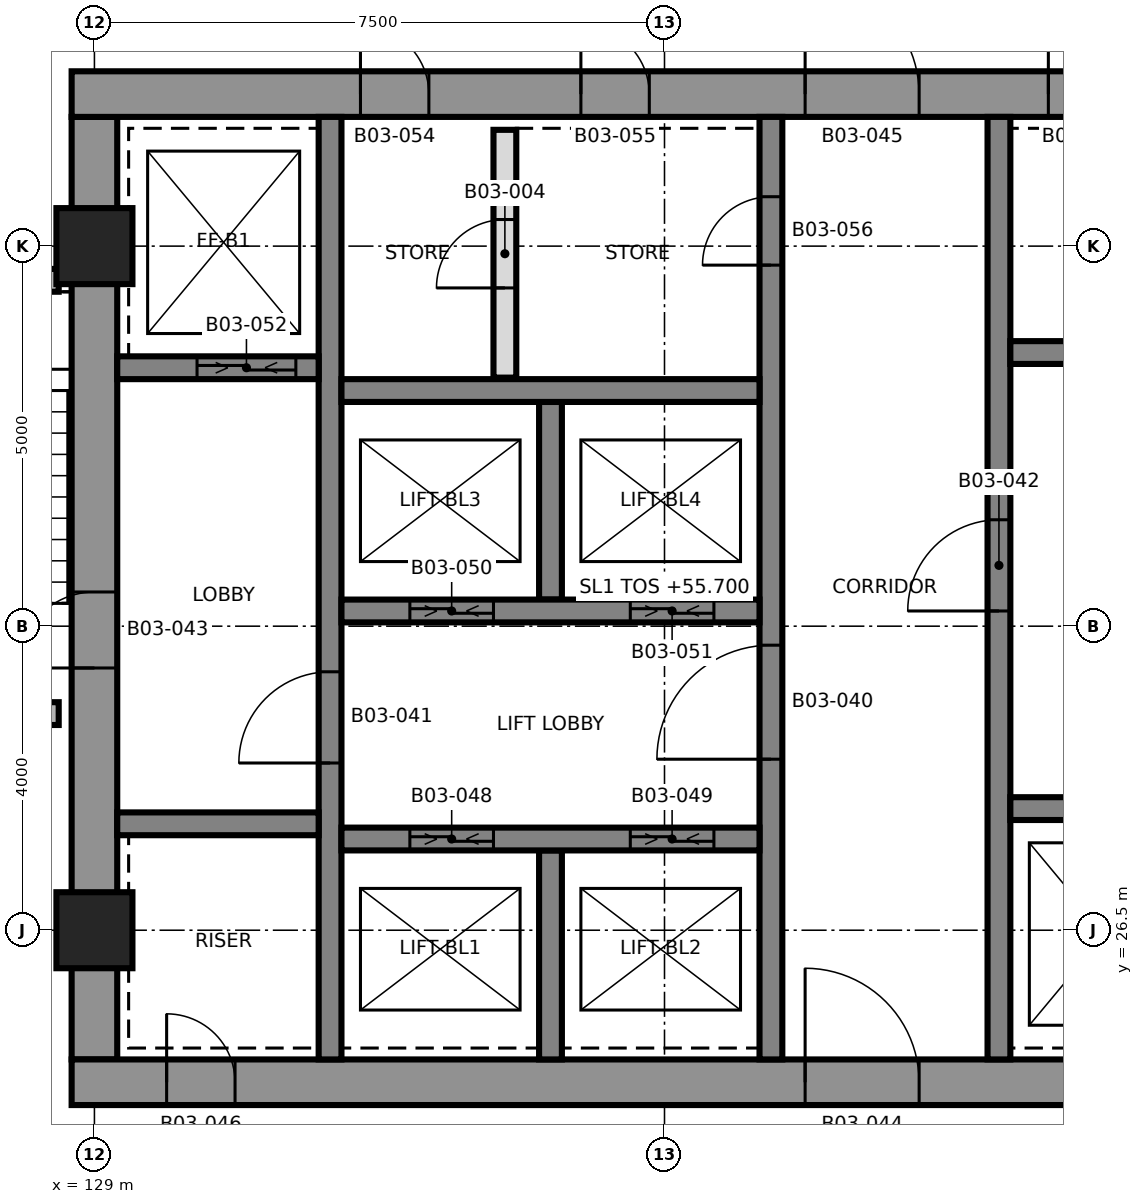
"""IFC4 building model, lengths in metres.
Left out: names, types, materials, properties, quantities, classifications, styles, units other than length and angle.
Written with IfcOpenShell. Run it as: python <this file> out.ifc"""

import sys

from ifc_helpers import new_model, si_unit, direction, frame, frame_2d, origin, origin_2d, place, context, subcontext, project, spatial, rectangle, extrude, element, fill, save


model = new_model("IFC4")
c1 = context("Model", 3, precision=1e-05, world=origin(), true_north=direction((0.0, 1.0)))
c2 = subcontext(c1, "Body", "Model", "MODEL_VIEW")
j1 = project(units=[si_unit("LENGTHUNIT", "METRE"), si_unit("PLANEANGLEUNIT", "RADIAN")], contexts=[c1])
p1 = place(None, origin())
s1 = spatial("IfcSite", under=j1, at=p1, CompositionType="ELEMENT")
p2 = place(p1, origin())
s2 = spatial("IfcBuilding", under=s1, at=p2, CompositionType="ELEMENT")
p3 = place(p2, frame((0.0, 0.0, 55.7)))
s3 = spatial("IfcBuildingStorey", under=s2, at=p3, CompositionType="ELEMENT", Elevation=55.7)
p4 = place(p3, frame((129.0, 24.8, 0.0), z_axis=(0.0, 0.0, 1.0), x_axis=(0.0, 1.0, 0.0)))
e1 = element("IfcWall", 1, at=p4, inside=s3, PredefinedType="SHEAR", context=c2, shape_type="SweptSolid", body=[
    extrude(rectangle(XDim=12.4, YDim=0.6, at=frame_2d((6.2, 0.0))), origin(), (0.0, 0.0, 1.0), 3.7),
])
p5 = place(p4, frame((5.15, 0.0, 0.0)))
e2 = element("IfcOpeningElement", 2, at=p5, cuts=e1, PredefinedType="OPENING", context=c2, shape_type="SweptSolid", body=[
    extrude(rectangle(XDim=1.0, YDim=2.1, at=frame_2d((0.5, 1.05))), frame((0.0, 0.31, 0.0), z_axis=(0.0, -1.0, 0.0), x_axis=(1.0, 0.0, 0.0)), (0.0, 0.0, 1.0), 0.62),
])
p6 = place(p3, frame((128.7, 24.5, 0.0), z_axis=(0.0, 0.0, 1.0), x_axis=(1.0, 0.0, 0.0)))
e3 = element("IfcWall", 3, at=p6, inside=s3, PredefinedType="SHEAR", context=c2, shape_type="SweptSolid", body=[
    extrude(rectangle(XDim=15.0, YDim=0.6, at=frame_2d((7.5, 0.0))), origin(), (0.0, 0.0, 1.0), 3.7),
])
p7 = place(p6, frame((9.65, 0.0, 0.0)))
e4 = element("IfcOpeningElement", 4, at=p7, cuts=e3, PredefinedType="OPENING", context=c2, shape_type="SweptSolid", body=[
    extrude(rectangle(XDim=1.5, YDim=2.1, at=frame_2d((0.75, 1.05))), frame((0.0, 0.31, 0.0), z_axis=(0.0, -1.0, 0.0), x_axis=(1.0, 0.0, 0.0)), (0.0, 0.0, 1.0), 0.62),
])
p8 = place(p6, frame((1.25, 0.0, 0.0)))
e5 = element("IfcOpeningElement", 5, at=p8, cuts=e3, PredefinedType="OPENING", context=c2, shape_type="SweptSolid", body=[
    extrude(rectangle(XDim=0.9, YDim=2.1, at=frame_2d((0.45, 1.05))), frame((0.0, 0.31, 0.0), z_axis=(0.0, -1.0, 0.0), x_axis=(1.0, 0.0, 0.0)), (0.0, 0.0, 1.0), 0.62),
])
p9 = place(p3, frame((128.7, 37.5, 0.0), z_axis=(0.0, 0.0, 1.0), x_axis=(1.0, 0.0, 0.0)))
e6 = element("IfcWall", 6, at=p9, inside=s3, PredefinedType="SHEAR", context=c2, shape_type="SweptSolid", body=[
    extrude(rectangle(XDim=15.0, YDim=0.6, at=frame_2d((7.5, 0.0))), origin(), (0.0, 0.0, 1.0), 3.7),
])
p10 = place(p9, frame((9.65, 0.0, 0.0)))
e7 = element("IfcOpeningElement", 7, at=p10, cuts=e6, PredefinedType="OPENING", context=c2, shape_type="SweptSolid", body=[
    extrude(rectangle(XDim=1.5, YDim=2.1, at=frame_2d((0.75, 1.05))), frame((0.0, 0.31, 0.0), z_axis=(0.0, -1.0, 0.0), x_axis=(1.0, 0.0, 0.0)), (0.0, 0.0, 1.0), 0.62),
])
p11 = place(p9, frame((12.85, 0.0, 0.0)))
e8 = element("IfcOpeningElement", 8, at=p11, cuts=e6, PredefinedType="OPENING", context=c2, shape_type="SweptSolid", body=[
    extrude(rectangle(XDim=0.9, YDim=2.1, at=frame_2d((0.45, 1.05))), frame((0.0, 0.31, 0.0), z_axis=(0.0, -1.0, 0.0), x_axis=(1.0, 0.0, 0.0)), (0.0, 0.0, 1.0), 0.62),
])
p12 = place(p9, frame((3.8, 0.0, 0.0)))
e9 = element("IfcOpeningElement", 9, at=p12, cuts=e6, PredefinedType="OPENING", context=c2, shape_type="SweptSolid", body=[
    extrude(rectangle(XDim=0.9, YDim=2.1, at=frame_2d((0.45, 1.05))), frame((0.0, 0.31, 0.0), z_axis=(0.0, -1.0, 0.0), x_axis=(1.0, 0.0, 0.0)), (0.0, 0.0, 1.0), 0.62),
])
p13 = place(p9, frame((6.7, 0.0, 0.0)))
e10 = element("IfcOpeningElement", 10, at=p13, cuts=e6, PredefinedType="OPENING", context=c2, shape_type="SweptSolid", body=[
    extrude(rectangle(XDim=0.9, YDim=2.1, at=frame_2d((0.45, 1.05))), frame((0.0, 0.31, 0.0), z_axis=(0.0, -1.0, 0.0), x_axis=(1.0, 0.0, 0.0)), (0.0, 0.0, 1.0), 0.62),
])
p14 = place(p3, frame((132.1, 24.8, 0.0), z_axis=(0.0, 0.0, 1.0), x_axis=(0.0, 1.0, 0.0)))
e11 = element("IfcWall", 11, at=p14, inside=s3, PredefinedType="SHEAR", context=c2, shape_type="SweptSolid", body=[
    extrude(rectangle(XDim=12.4, YDim=0.3, at=frame_2d((6.2, 0.0))), origin(), (0.0, 0.0, 1.0), 3.7),
])
p15 = place(p14, frame((3.9, 0.0, 0.0)))
e12 = element("IfcOpeningElement", 12, at=p15, cuts=e11, PredefinedType="OPENING", context=c2, shape_type="SweptSolid", body=[
    extrude(rectangle(XDim=1.2, YDim=2.1, at=frame_2d((0.6, 1.05))), frame((0.0, 0.16, 0.0), z_axis=(0.0, -1.0, 0.0), x_axis=(1.0, 0.0, 0.0)), (0.0, 0.0, 1.0), 0.32),
])
p16 = place(p3, frame((137.9, 24.8, 0.0), z_axis=(0.0, 0.0, 1.0), x_axis=(0.0, 1.0, 0.0)))
e13 = element("IfcWall", 13, at=p16, inside=s3, PredefinedType="SHEAR", context=c2, shape_type="SweptSolid", body=[
    extrude(rectangle(XDim=12.4, YDim=0.3, at=frame_2d((6.2, 0.0))), origin(), (0.0, 0.0, 1.0), 3.7),
])
p17 = place(p16, frame((3.95, 0.0, 0.0)))
e14 = element("IfcOpeningElement", 14, at=p17, cuts=e13, PredefinedType="OPENING", context=c2, shape_type="SweptSolid", body=[
    extrude(rectangle(XDim=1.5, YDim=2.1, at=frame_2d((0.75, 1.05))), frame((0.0, 0.16, 0.0), z_axis=(0.0, -1.0, 0.0), x_axis=(1.0, 0.0, 0.0)), (0.0, 0.0, 1.0), 0.32),
])
p18 = place(p16, frame((10.45, 0.0, 0.0)))
e15 = element("IfcOpeningElement", 15, at=p18, cuts=e13, PredefinedType="OPENING", context=c2, shape_type="SweptSolid", body=[
    extrude(rectangle(XDim=0.9, YDim=2.1, at=frame_2d((0.45, 1.05))), frame((0.0, 0.16, 0.0), z_axis=(0.0, -1.0, 0.0), x_axis=(1.0, 0.0, 0.0)), (0.0, 0.0, 1.0), 0.32),
])
p19 = place(p3, frame((140.9, 24.8, 0.0), z_axis=(0.0, 0.0, 1.0), x_axis=(0.0, 1.0, 0.0)))
e16 = element("IfcWall", 16, at=p19, inside=s3, PredefinedType="SHEAR", context=c2, shape_type="SweptSolid", body=[
    extrude(rectangle(XDim=12.4, YDim=0.3, at=frame_2d((6.2, 0.0))), origin(), (0.0, 0.0, 1.0), 3.7),
])
p20 = place(p19, frame((5.9, 0.0, 0.0)))
e17 = element("IfcOpeningElement", 17, at=p20, cuts=e16, PredefinedType="OPENING", context=c2, shape_type="SweptSolid", body=[
    extrude(rectangle(XDim=1.2, YDim=2.1, at=frame_2d((0.6, 1.05))), frame((0.0, 0.16, 0.0), z_axis=(0.0, -1.0, 0.0), x_axis=(1.0, 0.0, 0.0)), (0.0, 0.0, 1.0), 0.32),
])
p21 = place(p3, frame((135.0, 24.8, 0.0), z_axis=(0.0, 0.0, 1.0), x_axis=(0.0, 1.0, 0.0)))
e18 = element("IfcWall", 18, at=p21, inside=s3, PredefinedType="SHEAR", context=c2, shape_type="SweptSolid", body=[
    extrude(rectangle(XDim=2.75, YDim=0.3, at=frame_2d((1.375, 0.0))), origin(), (0.0, 0.0, 1.0), 3.7),
])
p22 = place(p3, frame((135.0, 30.85, 0.0), z_axis=(0.0, 0.0, 1.0), x_axis=(0.0, 1.0, 0.0)))
e19 = element("IfcWall", 19, at=p22, inside=s3, PredefinedType="SHEAR", context=c2, shape_type="SweptSolid", body=[
    extrude(rectangle(XDim=2.6, YDim=0.3, at=frame_2d((1.3, 0.0))), origin(), (0.0, 0.0, 1.0), 3.7),
])
p23 = place(p3, frame((132.25, 27.7, 0.0), z_axis=(0.0, 0.0, 1.0), x_axis=(1.0, 0.0, 0.0)))
e20 = element("IfcWall", 20, at=p23, inside=s3, PredefinedType="SHEAR", context=c2, shape_type="SweptSolid", body=[
    extrude(rectangle(XDim=5.5, YDim=0.3, at=frame_2d((2.75, 0.0))), origin(), (0.0, 0.0, 1.0), 3.7),
])
p24 = place(p23, frame((0.9, 0.0, 0.0)))
e21 = element("IfcOpeningElement", 21, at=p24, cuts=e20, PredefinedType="OPENING", context=c2, shape_type="SweptSolid", body=[
    extrude(rectangle(XDim=1.1, YDim=2.4, at=frame_2d((0.55, 1.2))), frame((0.0, 0.16, 0.0), z_axis=(0.0, -1.0, 0.0), x_axis=(1.0, 0.0, 0.0)), (0.0, 0.0, 1.0), 0.32),
])
p25 = place(p23, frame((3.8, 0.0, 0.0)))
e22 = element("IfcOpeningElement", 22, at=p25, cuts=e20, PredefinedType="OPENING", context=c2, shape_type="SweptSolid", body=[
    extrude(rectangle(XDim=1.1, YDim=2.4, at=frame_2d((0.55, 1.2))), frame((0.0, 0.16, 0.0), z_axis=(0.0, -1.0, 0.0), x_axis=(1.0, 0.0, 0.0)), (0.0, 0.0, 1.0), 0.32),
])
p26 = place(p3, frame((132.25, 30.7, 0.0), z_axis=(0.0, 0.0, 1.0), x_axis=(1.0, 0.0, 0.0)))
e23 = element("IfcWall", 23, at=p26, inside=s3, PredefinedType="SHEAR", context=c2, shape_type="SweptSolid", body=[
    extrude(rectangle(XDim=5.5, YDim=0.3, at=frame_2d((2.75, 0.0))), origin(), (0.0, 0.0, 1.0), 3.7),
])
p27 = place(p26, frame((0.9, 0.0, 0.0)))
e24 = element("IfcOpeningElement", 24, at=p27, cuts=e23, PredefinedType="OPENING", context=c2, shape_type="SweptSolid", body=[
    extrude(rectangle(XDim=1.1, YDim=2.4, at=frame_2d((0.55, 1.2))), frame((0.0, 0.16, 0.0), z_axis=(0.0, -1.0, 0.0), x_axis=(1.0, 0.0, 0.0)), (0.0, 0.0, 1.0), 0.32),
])
p28 = place(p26, frame((3.8, 0.0, 0.0)))
e25 = element("IfcOpeningElement", 25, at=p28, cuts=e23, PredefinedType="OPENING", context=c2, shape_type="SweptSolid", body=[
    extrude(rectangle(XDim=1.1, YDim=2.4, at=frame_2d((0.55, 1.2))), frame((0.0, 0.16, 0.0), z_axis=(0.0, -1.0, 0.0), x_axis=(1.0, 0.0, 0.0)), (0.0, 0.0, 1.0), 0.32),
])
p29 = place(p3, frame((132.25, 33.6, 0.0), z_axis=(0.0, 0.0, 1.0), x_axis=(1.0, 0.0, 0.0)))
e26 = element("IfcWall", 26, at=p29, inside=s3, PredefinedType="SHEAR", context=c2, shape_type="SweptSolid", body=[
    extrude(rectangle(XDim=5.5, YDim=0.3, at=frame_2d((2.75, 0.0))), origin(), (0.0, 0.0, 1.0), 3.7),
])
p30 = place(p3, frame((129.3, 27.9, 0.0), z_axis=(0.0, 0.0, 1.0), x_axis=(1.0, 0.0, 0.0)))
e27 = element("IfcWall", 27, at=p30, inside=s3, PredefinedType="SHEAR", context=c2, shape_type="SweptSolid", body=[
    extrude(rectangle(XDim=2.65, YDim=0.3, at=frame_2d((1.325, 0.0))), origin(), (0.0, 0.0, 1.0), 3.7),
])
p31 = place(p3, frame((129.3, 33.9, 0.0), z_axis=(0.0, 0.0, 1.0), x_axis=(1.0, 0.0, 0.0)))
e28 = element("IfcWall", 28, at=p31, inside=s3, PredefinedType="SHEAR", context=c2, shape_type="SweptSolid", body=[
    extrude(rectangle(XDim=2.65, YDim=0.3, at=frame_2d((1.325, 0.0))), origin(), (0.0, 0.0, 1.0), 3.7),
])
p32 = place(p31, frame((1.05, 0.0, 0.0)))
e29 = element("IfcOpeningElement", 29, at=p32, cuts=e28, PredefinedType="OPENING", context=c2, shape_type="SweptSolid", body=[
    extrude(rectangle(XDim=1.3, YDim=2.4, at=frame_2d((0.65, 1.2))), frame((0.0, 0.16, 0.0), z_axis=(0.0, -1.0, 0.0), x_axis=(1.0, 0.0, 0.0)), (0.0, 0.0, 1.0), 0.32),
])
p33 = place(p3, frame((141.05, 28.1, 0.0), z_axis=(0.0, 0.0, 1.0), x_axis=(1.0, 0.0, 0.0)))
e30 = element("IfcWall", 30, at=p33, inside=s3, PredefinedType="SHEAR", context=c2, shape_type="SweptSolid", body=[
    extrude(rectangle(XDim=2.65, YDim=0.3, at=frame_2d((1.325, 0.0))), origin(), (0.0, 0.0, 1.0), 3.7),
])
p34 = place(p33, frame((0.75, 0.0, 0.0)))
e31 = element("IfcOpeningElement", 31, at=p34, cuts=e30, PredefinedType="OPENING", context=c2, shape_type="SweptSolid", body=[
    extrude(rectangle(XDim=1.3, YDim=2.4, at=frame_2d((0.65, 1.2))), frame((0.0, 0.16, 0.0), z_axis=(0.0, -1.0, 0.0), x_axis=(1.0, 0.0, 0.0)), (0.0, 0.0, 1.0), 0.32),
])
p35 = place(p3, frame((141.05, 34.1, 0.0), z_axis=(0.0, 0.0, 1.0), x_axis=(1.0, 0.0, 0.0)))
e32 = element("IfcWall", 32, at=p35, inside=s3, PredefinedType="SHEAR", context=c2, shape_type="SweptSolid", body=[
    extrude(rectangle(XDim=2.65, YDim=0.3, at=frame_2d((1.325, 0.0))), origin(), (0.0, 0.0, 1.0), 3.7),
])
for number, where, z_axis, x_axis in (
    (33, (129.0, 26.5, 0.0), (0.0, 0.0, 1.0), (1.0, 0.0, 0.0)),
    (34, (129.0, 35.5, 0.0), (0.0, 0.0, 1.0), (1.0, 0.0, 0.0)),
):
    element("IfcColumn", number, at=place(p3, frame(where, z_axis=z_axis, x_axis=x_axis)), inside=s3, PredefinedType="COLUMN", context=c2, shape_type="SweptSolid", body=[
        extrude(rectangle(XDim=1.0, YDim=1.0, at=origin_2d()), origin(), (0.0, 0.0, 1.0), 3.7),
    ])
p36 = place(p3, frame((125.7, 29.35, 0.0), z_axis=(0.0, 0.0, 1.0), x_axis=(1.0, 0.0, 0.0)))
e35 = element("IfcWall", 35, at=p36, inside=s3, PredefinedType="SHEAR", context=c2, shape_type="SweptSolid", body=[
    extrude(rectangle(XDim=2.83, YDim=0.3, at=frame_2d((1.415, 0.0))), origin(), (0.0, 0.0, 1.0), 3.4),
])
p37 = place(p36, frame((0.975, 0.0, 0.0)))
e36 = element("IfcOpeningElement", 36, at=p37, cuts=e35, PredefinedType="OPENING", context=c2, shape_type="SweptSolid", body=[
    extrude(rectangle(XDim=1.2, YDim=2.1, at=frame_2d((0.6, 1.05))), frame((0.0, 0.16, 0.0), z_axis=(0.0, -1.0, 0.0), x_axis=(1.0, 0.0, 0.0)), (0.0, 0.0, 1.0), 0.32),
])
p38 = place(p3, frame((125.7, 35.05, 0.0), z_axis=(0.0, 0.0, 1.0), x_axis=(1.0, 0.0, 0.0)))
e37 = element("IfcWall", 37, at=p38, inside=s3, PredefinedType="SHEAR", context=c2, shape_type="SweptSolid", body=[
    extrude(rectangle(XDim=2.83, YDim=0.3, at=frame_2d((1.415, 0.0))), origin(), (0.0, 0.0, 1.0), 3.4),
])
p39 = place(p3, frame((134.4, 33.77, 0.0), z_axis=(0.0, 0.0, 1.0), x_axis=(0.0, 1.0, 0.0)))
e38 = element("IfcWall", 38, at=p39, inside=s3, PredefinedType="PARTITIONING", context=c2, shape_type="SweptSolid", body=[
    extrude(rectangle(XDim=3.26, YDim=0.3, at=frame_2d((1.63, 0.0))), origin(), (0.0, 0.0, 1.0), 3.4),
])
p40 = place(p39, frame((1.18, 0.0, 0.0)))
e39 = element("IfcOpeningElement", 39, at=p40, cuts=e38, PredefinedType="OPENING", context=c2, shape_type="SweptSolid", body=[
    extrude(rectangle(XDim=0.9, YDim=2.1, at=frame_2d((0.45, 1.05))), frame((0.0, 0.16, 0.0), z_axis=(0.0, -1.0, 0.0), x_axis=(1.0, 0.0, 0.0)), (0.0, 0.0, 1.0), 0.32),
])
p41 = place(p40, origin())
e40 = element("IfcDoor", 40, at=p41, inside=s3, OperationType="SINGLE_SWING_RIGHT", PredefinedType="DOOR", context=c2, shape_type="SweptSolid", body=[
    extrude(rectangle(XDim=0.9, YDim=2.1, at=frame_2d((0.45, 1.05))), frame((0.0, 0.025, 0.0), z_axis=(0.0, -1.0, 0.0), x_axis=(1.0, 0.0, 0.0)), (0.0, 0.0, 1.0), 0.05),
])
fill(e39, e40)
p42 = place(p17, origin())
e41 = element("IfcDoor", 41, at=p42, inside=s3, OperationType="SINGLE_SWING_RIGHT", PredefinedType="DOOR", context=c2, shape_type="SweptSolid", body=[
    extrude(rectangle(XDim=1.5, YDim=2.1, at=frame_2d((0.75, 1.05))), frame((0.0, 0.025, 0.0), z_axis=(0.0, -1.0, 0.0), x_axis=(1.0, 0.0, 0.0)), (0.0, 0.0, 1.0), 0.05),
])
fill(e14, e41)
p43 = place(p15, origin())
e42 = element("IfcDoor", 42, at=p43, inside=s3, OperationType="SINGLE_SWING_LEFT", PredefinedType="DOOR", context=c2, shape_type="SweptSolid", body=[
    extrude(rectangle(XDim=1.2, YDim=2.1, at=frame_2d((0.6, 1.05))), frame((0.0, 0.025, 0.0), z_axis=(0.0, -1.0, 0.0), x_axis=(1.0, 0.0, 0.0)), (0.0, 0.0, 1.0), 0.05),
])
fill(e12, e42)
p44 = place(p20, origin())
e43 = element("IfcDoor", 43, at=p44, inside=s3, OperationType="SINGLE_SWING_RIGHT", PredefinedType="DOOR", context=c2, shape_type="SweptSolid", body=[
    extrude(rectangle(XDim=1.2, YDim=2.1, at=frame_2d((0.6, 1.05))), frame((0.0, 0.025, 0.0), z_axis=(0.0, -1.0, 0.0), x_axis=(1.0, 0.0, 0.0)), (0.0, 0.0, 1.0), 0.05),
])
fill(e17, e43)
p45 = place(p5, origin())
e44 = element("IfcDoor", 44, at=p45, inside=s3, OperationType="SINGLE_SWING_RIGHT", PredefinedType="DOOR", context=c2, shape_type="SweptSolid", body=[
    extrude(rectangle(XDim=1.0, YDim=2.1, at=frame_2d((0.5, 1.05))), frame((0.0, 0.025, 0.0), z_axis=(0.0, -1.0, 0.0), x_axis=(1.0, 0.0, 0.0)), (0.0, 0.0, 1.0), 0.05),
])
fill(e2, e44)
p46 = place(p7, origin())
e45 = element("IfcDoor", 45, at=p46, inside=s3, OperationType="SINGLE_SWING_LEFT", PredefinedType="DOOR", context=c2, shape_type="SweptSolid", body=[
    extrude(rectangle(XDim=1.5, YDim=2.1, at=frame_2d((0.75, 1.05))), frame((0.0, 0.025, 0.0), z_axis=(0.0, -1.0, 0.0), x_axis=(1.0, 0.0, 0.0)), (0.0, 0.0, 1.0), 0.05),
])
fill(e4, e45)
p47 = place(p10, origin())
e46 = element("IfcDoor", 46, at=p47, inside=s3, OperationType="SINGLE_SWING_RIGHT", PredefinedType="DOOR", context=c2, shape_type="SweptSolid", body=[
    extrude(rectangle(XDim=1.5, YDim=2.1, at=frame_2d((0.75, 1.05))), frame((0.0, 0.025, 0.0), z_axis=(0.0, -1.0, 0.0), x_axis=(1.0, 0.0, 0.0)), (0.0, 0.0, 1.0), 0.05),
])
fill(e7, e46)
p48 = place(p8, origin())
e47 = element("IfcDoor", 47, at=p48, inside=s3, OperationType="SINGLE_SWING_LEFT", PredefinedType="DOOR", context=c2, shape_type="SweptSolid", body=[
    extrude(rectangle(XDim=0.9, YDim=2.1, at=frame_2d((0.45, 1.05))), frame((0.0, 0.025, 0.0), z_axis=(0.0, -1.0, 0.0), x_axis=(1.0, 0.0, 0.0)), (0.0, 0.0, 1.0), 0.05),
])
fill(e5, e47)
p49 = place(p11, origin())
e48 = element("IfcDoor", 48, at=p49, inside=s3, OperationType="SINGLE_SWING_RIGHT", PredefinedType="DOOR", context=c2, shape_type="SweptSolid", body=[
    extrude(rectangle(XDim=0.9, YDim=2.1, at=frame_2d((0.45, 1.05))), frame((0.0, 0.025, 0.0), z_axis=(0.0, -1.0, 0.0), x_axis=(1.0, 0.0, 0.0)), (0.0, 0.0, 1.0), 0.05),
])
fill(e8, e48)
p50 = place(p24, origin())
e49 = element("IfcDoor", 49, at=p50, inside=s3, OperationType="SLIDING_TO_LEFT", PredefinedType="DOOR", context=c2, shape_type="SweptSolid", body=[
    extrude(rectangle(XDim=1.1, YDim=2.4, at=frame_2d((0.55, 1.2))), frame((0.0, 0.025, 0.0), z_axis=(0.0, -1.0, 0.0), x_axis=(1.0, 0.0, 0.0)), (0.0, 0.0, 1.0), 0.05),
])
fill(e21, e49)
p51 = place(p25, origin())
e50 = element("IfcDoor", 50, at=p51, inside=s3, OperationType="SLIDING_TO_LEFT", PredefinedType="DOOR", context=c2, shape_type="SweptSolid", body=[
    extrude(rectangle(XDim=1.1, YDim=2.4, at=frame_2d((0.55, 1.2))), frame((0.0, 0.025, 0.0), z_axis=(0.0, -1.0, 0.0), x_axis=(1.0, 0.0, 0.0)), (0.0, 0.0, 1.0), 0.05),
])
fill(e22, e50)
p52 = place(p27, origin())
e51 = element("IfcDoor", 51, at=p52, inside=s3, OperationType="SLIDING_TO_LEFT", PredefinedType="DOOR", context=c2, shape_type="SweptSolid", body=[
    extrude(rectangle(XDim=1.1, YDim=2.4, at=frame_2d((0.55, 1.2))), frame((0.0, 0.025, 0.0), z_axis=(0.0, -1.0, 0.0), x_axis=(1.0, 0.0, 0.0)), (0.0, 0.0, 1.0), 0.05),
])
fill(e24, e51)
p53 = place(p28, origin())
e52 = element("IfcDoor", 52, at=p53, inside=s3, OperationType="SLIDING_TO_LEFT", PredefinedType="DOOR", context=c2, shape_type="SweptSolid", body=[
    extrude(rectangle(XDim=1.1, YDim=2.4, at=frame_2d((0.55, 1.2))), frame((0.0, 0.025, 0.0), z_axis=(0.0, -1.0, 0.0), x_axis=(1.0, 0.0, 0.0)), (0.0, 0.0, 1.0), 0.05),
])
fill(e25, e52)
p54 = place(p32, origin())
e53 = element("IfcDoor", 53, at=p54, inside=s3, OperationType="SLIDING_TO_LEFT", PredefinedType="DOOR", context=c2, shape_type="SweptSolid", body=[
    extrude(rectangle(XDim=1.3, YDim=2.4, at=frame_2d((0.65, 1.2))), frame((0.0, 0.025, 0.0), z_axis=(0.0, -1.0, 0.0), x_axis=(1.0, 0.0, 0.0)), (0.0, 0.0, 1.0), 0.05),
])
fill(e29, e53)
p55 = place(p12, origin())
e54 = element("IfcDoor", 54, at=p55, inside=s3, OperationType="SINGLE_SWING_LEFT", PredefinedType="DOOR", context=c2, shape_type="SweptSolid", body=[
    extrude(rectangle(XDim=0.9, YDim=2.1, at=frame_2d((0.45, 1.05))), frame((0.0, 0.025, 0.0), z_axis=(0.0, -1.0, 0.0), x_axis=(1.0, 0.0, 0.0)), (0.0, 0.0, 1.0), 0.05),
])
fill(e9, e54)
p56 = place(p13, origin())
e55 = element("IfcDoor", 55, at=p56, inside=s3, OperationType="SINGLE_SWING_RIGHT", PredefinedType="DOOR", context=c2, shape_type="SweptSolid", body=[
    extrude(rectangle(XDim=0.9, YDim=2.1, at=frame_2d((0.45, 1.05))), frame((0.0, 0.025, 0.0), z_axis=(0.0, -1.0, 0.0), x_axis=(1.0, 0.0, 0.0)), (0.0, 0.0, 1.0), 0.05),
])
fill(e10, e55)
p57 = place(p18, origin())
e56 = element("IfcDoor", 56, at=p57, inside=s3, OperationType="SINGLE_SWING_RIGHT", PredefinedType="DOOR", context=c2, shape_type="SweptSolid", body=[
    extrude(rectangle(XDim=0.9, YDim=2.1, at=frame_2d((0.45, 1.05))), frame((0.0, 0.025, 0.0), z_axis=(0.0, -1.0, 0.0), x_axis=(1.0, 0.0, 0.0)), (0.0, 0.0, 1.0), 0.05),
])
fill(e15, e56)
save(model, sys.argv[1])
